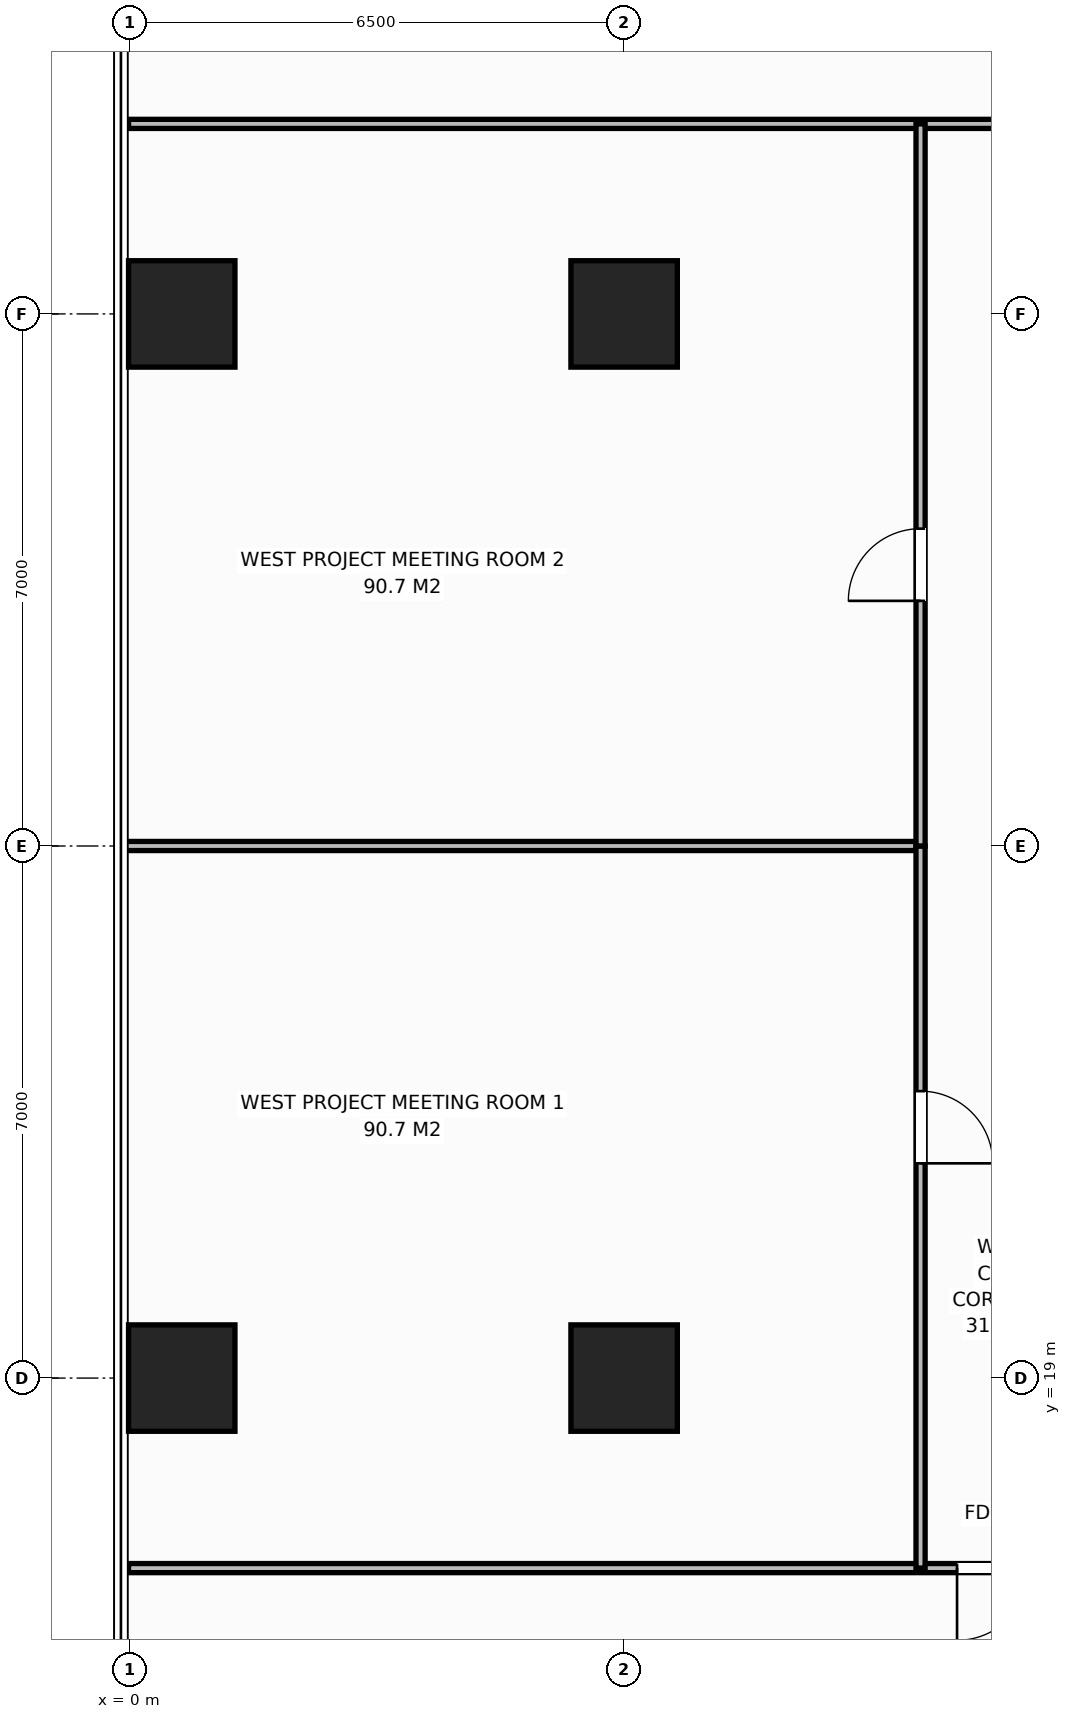
"""IFC4 building model, lengths in metres.
Left out: names, types, materials, properties, quantities, classifications, styles, units other than length and angle.
Written with IfcOpenShell. Run it as: python <this file> out.ifc"""

import sys

from ifc_helpers import new_model, si_unit, direction, frame, frame_2d, origin, origin_2d, place, context, subcontext, project, spatial, rectangle, extrude, element, fill, save


model = new_model("IFC4")
c1 = context("Model", 3, precision=1e-05, world=origin(), true_north=direction((0.0, 1.0)))
c2 = subcontext(c1, "Body", "Model", "MODEL_VIEW")
j1 = project(units=[si_unit("LENGTHUNIT", "METRE"), si_unit("PLANEANGLEUNIT", "RADIAN")], contexts=[c1])
p1 = place(None, origin())
s1 = spatial("IfcSite", under=j1, at=p1, CompositionType="ELEMENT")
p2 = place(p1, origin())
s2 = spatial("IfcBuilding", under=s1, at=p2, CompositionType="ELEMENT")
p3 = place(p2, frame((0.0, 0.0, 46.8)))
s3 = spatial("IfcBuildingStorey", under=s2, at=p3, CompositionType="ELEMENT", Elevation=46.8)
for number, where, z_axis, x_axis in (
    (1, (6.5, 19.0, 0.0), (0.0, 0.0, 1.0), (1.0, 0.0, 0.0)),
    (2, (6.5, 33.0, 0.0), (0.0, 0.0, 1.0), (1.0, 0.0, 0.0)),
    (3, (0.68, 19.0, 0.0), (0.0, 0.0, 1.0), (1.0, 0.0, 0.0)),
    (4, (0.68, 33.0, 0.0), (0.0, 0.0, 1.0), (1.0, 0.0, 0.0)),
):
    element("IfcColumn", number, at=place(p3, frame(where, z_axis=z_axis, x_axis=x_axis)), inside=s3, PredefinedType="COLUMN", context=c2, shape_type="SweptSolid", body=[
        extrude(rectangle(XDim=1.4, YDim=1.4, at=origin_2d()), origin(), (0.0, 0.0, 1.0), 3.8),
    ])
p4 = place(p3, frame((-0.02, 35.5, 0.0), z_axis=(0.0, 0.0, 1.0), x_axis=(1.0, 0.0, 0.0)))
e5 = element("IfcWall", 5, at=p4, inside=s3, PredefinedType="PARTITIONING", context=c2, shape_type="SweptSolid", body=[
    extrude(rectangle(XDim=20.386, YDim=0.12, at=frame_2d((10.193, 0.0))), origin(), (0.0, 0.0, 1.0), 3.55),
])
p5 = place(p4, frame((14.928, 0.0, 0.0)))
e6 = element("IfcOpeningElement", 6, at=p5, cuts=e5, PredefinedType="OPENING", context=c2, shape_type="SweptSolid", body=[
    extrude(rectangle(XDim=0.95, YDim=2.15, at=frame_2d((0.475, 1.075))), frame((0.0, 0.07, 0.0), z_axis=(0.0, -1.0, 0.0), x_axis=(1.0, 0.0, 0.0)), (0.0, 0.0, 1.0), 0.14),
])
p6 = place(p3, frame((-0.02, 16.5, 0.0), z_axis=(0.0, 0.0, 1.0), x_axis=(1.0, 0.0, 0.0)))
e7 = element("IfcWall", 7, at=p6, inside=s3, PredefinedType="PARTITIONING", context=c2, shape_type="SweptSolid", body=[
    extrude(rectangle(XDim=13.16, YDim=0.12, at=frame_2d((6.58, 0.0))), origin(), (0.0, 0.0, 1.0), 3.55),
])
p7 = place(p6, frame((10.9, 0.0, 0.0)))
e8 = element("IfcOpeningElement", 8, at=p7, cuts=e7, PredefinedType="OPENING", context=c2, shape_type="SweptSolid", body=[
    extrude(rectangle(XDim=0.95, YDim=2.15, at=frame_2d((0.475, 1.075))), frame((0.0, 0.07, 0.0), z_axis=(0.0, -1.0, 0.0), x_axis=(1.0, 0.0, 0.0)), (0.0, 0.0, 1.0), 0.14),
])
p8 = place(p3, frame((-0.18, 26.0, 0.0), z_axis=(0.0, 0.0, 1.0), x_axis=(1.0, 0.0, 0.0)))
e9 = element("IfcWall", 9, at=p8, inside=s3, PredefinedType="PARTITIONING", context=c2, shape_type="SweptSolid", body=[
    extrude(rectangle(XDim=10.58, YDim=0.12, at=frame_2d((5.29, 0.0))), origin(), (0.0, 0.0, 1.0), 3.55),
])
p9 = place(p3, frame((10.4, 16.5, 0.0), z_axis=(0.0, 0.0, 1.0), x_axis=(0.0, 1.0, 0.0)))
e10 = element("IfcWall", 10, at=p9, inside=s3, PredefinedType="PARTITIONING", context=c2, shape_type="SweptSolid", body=[
    extrude(rectangle(XDim=9.5, YDim=0.12, at=frame_2d((4.75, 0.0))), origin(), (0.0, 0.0, 1.0), 3.55),
])
p10 = place(p9, frame((5.325, 0.0, 0.0)))
e11 = element("IfcOpeningElement", 11, at=p10, cuts=e10, PredefinedType="OPENING", context=c2, shape_type="SweptSolid", body=[
    extrude(rectangle(XDim=0.95, YDim=2.15, at=frame_2d((0.475, 1.075))), frame((0.0, 0.07, 0.0), z_axis=(0.0, -1.0, 0.0), x_axis=(1.0, 0.0, 0.0)), (0.0, 0.0, 1.0), 0.14),
])
p11 = place(p3, frame((10.4, 26.0, 0.0), z_axis=(0.0, 0.0, 1.0), x_axis=(0.0, 1.0, 0.0)))
e12 = element("IfcWall", 12, at=p11, inside=s3, PredefinedType="PARTITIONING", context=c2, shape_type="SweptSolid", body=[
    extrude(rectangle(XDim=9.5, YDim=0.12, at=frame_2d((4.75, 0.0))), origin(), (0.0, 0.0, 1.0), 3.55),
])
p12 = place(p11, frame((3.225, 0.0, 0.0)))
e13 = element("IfcOpeningElement", 13, at=p12, cuts=e12, PredefinedType="OPENING", context=c2, shape_type="SweptSolid", body=[
    extrude(rectangle(XDim=0.95, YDim=2.15, at=frame_2d((0.475, 1.075))), frame((0.0, 0.07, 0.0), z_axis=(0.0, -1.0, 0.0), x_axis=(1.0, 0.0, 0.0)), (0.0, 0.0, 1.0), 0.14),
])
p13 = place(p7, origin())
e14 = element("IfcDoor", 14, at=p13, inside=s3, OperationType="SINGLE_SWING_RIGHT", PredefinedType="DOOR", context=c2, shape_type="SweptSolid", body=[
    extrude(rectangle(XDim=0.95, YDim=2.15, at=frame_2d((0.475, 1.075))), frame((0.0, 0.025, 0.0), z_axis=(0.0, -1.0, 0.0), x_axis=(1.0, 0.0, 0.0)), (0.0, 0.0, 1.0), 0.05),
])
fill(e8, e14)
p14 = place(p10, origin())
e15 = element("IfcDoor", 15, at=p14, inside=s3, OperationType="SINGLE_SWING_RIGHT", PredefinedType="DOOR", context=c2, shape_type="SweptSolid", body=[
    extrude(rectangle(XDim=0.95, YDim=2.15, at=frame_2d((0.475, 1.075))), frame((0.0, 0.025, 0.0), z_axis=(0.0, -1.0, 0.0), x_axis=(1.0, 0.0, 0.0)), (0.0, 0.0, 1.0), 0.05),
])
fill(e11, e15)
p15 = place(p12, origin())
e16 = element("IfcDoor", 16, at=p15, inside=s3, OperationType="SINGLE_SWING_LEFT", PredefinedType="DOOR", context=c2, shape_type="SweptSolid", body=[
    extrude(rectangle(XDim=0.95, YDim=2.15, at=frame_2d((0.475, 1.075))), frame((0.0, 0.025, 0.0), z_axis=(0.0, -1.0, 0.0), x_axis=(1.0, 0.0, 0.0)), (0.0, 0.0, 1.0), 0.05),
])
fill(e13, e16)
save(model, sys.argv[1])
